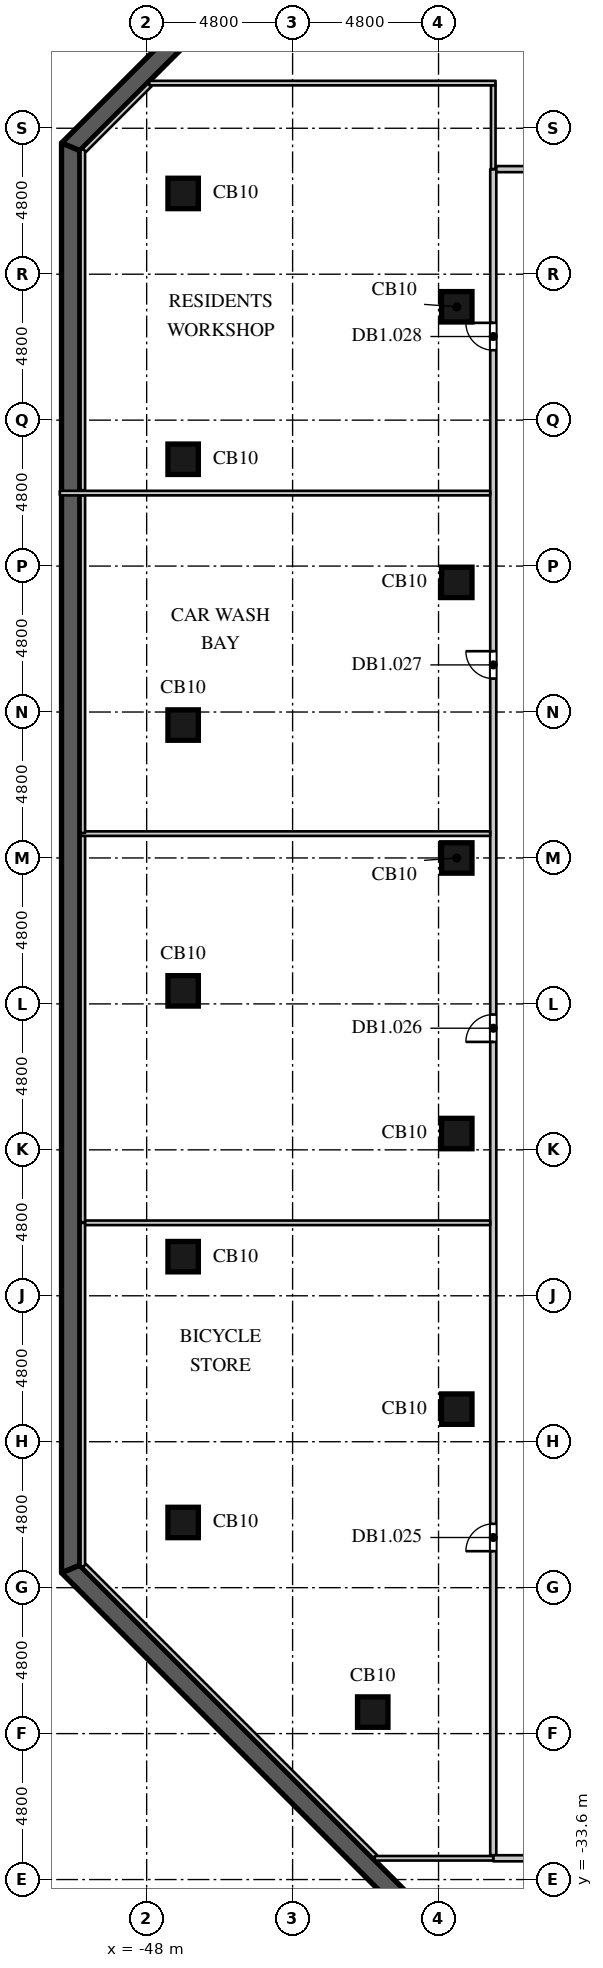
"""IFC4 building model, lengths in metres.
Left out: names, types, materials, properties, quantities, classifications, styles, units other than length and angle.
Written with IfcOpenShell. Run it as: python <this file> out.ifc"""

import sys

from ifc_helpers import new_model, si_unit, direction, frame, frame_2d, origin, origin_2d, place, context, subcontext, project, spatial, polyline, rectangle, outline, extrude, element, fill, save


model = new_model("IFC4")
c1 = context("Model", 3, precision=1e-05, world=origin(), true_north=direction((0.0, 1.0)))
c2 = subcontext(c1, "Body", "Model", "MODEL_VIEW")
j1 = project(units=[si_unit("LENGTHUNIT", "METRE"), si_unit("PLANEANGLEUNIT", "RADIAN")], contexts=[c1])
p1 = place(None, origin())
s1 = spatial("IfcSite", under=j1, at=p1, CompositionType="ELEMENT")
p2 = place(p1, origin())
s2 = spatial("IfcBuilding", under=s1, at=p2, CompositionType="ELEMENT")
p3 = place(p2, frame((0.0, 0.0, -4.5)))
s3 = spatial("IfcBuildingStorey", under=s2, at=p3, CompositionType="ELEMENT", Elevation=-4.5)
p4 = place(p3, origin())
e1 = element("IfcWall", 1, at=p4, inside=s3, PredefinedType="SOLIDWALL", context=c2, shape_type="SweptSolid", body=[
    extrude(outline(polyline([(-23.513, 50.8), (-50.8, 23.513), (-50.2, 23.264), (-23.264, 50.2), (-23.513, 50.8)])), origin(), (0.0, 0.0, 1.0), 4.5),
])
p5 = place(p3, origin())
e2 = element("IfcWall", 2, at=p5, inside=s3, PredefinedType="SOLIDWALL", context=c2, shape_type="SweptSolid", body=[
    extrude(outline(polyline([(-50.8, 23.513), (-50.8, -23.513), (-50.2, -23.264), (-50.2, 23.264), (-50.8, 23.513)])), origin(), (0.0, 0.0, 1.0), 4.5),
])
p6 = place(p3, origin())
e3 = element("IfcWall", 3, at=p6, inside=s3, PredefinedType="SOLIDWALL", context=c2, shape_type="SweptSolid", body=[
    extrude(outline(polyline([(-50.8, -23.513), (-23.513, -50.8), (-23.264, -50.2), (-50.2, -23.264), (-50.8, -23.513)])), origin(), (0.0, 0.0, 1.0), 4.5),
])
for number, where, z_axis, x_axis in (
    (4, (-40.564, -28.092, 0.0), (0.0, 0.0, 1.0), (1.0, 0.0, 0.0)),
    (5, (-46.8, -21.856, 0.0), (0.0, 0.0, 1.0), (1.0, 0.0, 0.0)),
    (6, (-37.8, -18.128, 0.0), (0.0, 0.0, 1.0), (1.0, 0.0, 0.0)),
    (7, (-46.8, -13.114, 0.0), (0.0, 0.0, 1.0), (1.0, 0.0, 0.0)),
    (8, (-37.8, -9.064, 0.0), (0.0, 0.0, 1.0), (1.0, 0.0, 0.0)),
    (9, (-46.8, -4.371, 0.0), (0.0, 0.0, 1.0), (1.0, 0.0, 0.0)),
    (10, (-37.8, 0.0, 0.0), (0.0, 0.0, 1.0), (1.0, 0.0, 0.0)),
    (11, (-46.8, 4.371, 0.0), (0.0, 0.0, 1.0), (1.0, 0.0, 0.0)),
    (12, (-37.8, 9.064, 0.0), (0.0, 0.0, 1.0), (1.0, 0.0, 0.0)),
    (13, (-46.8, 13.114, 0.0), (0.0, 0.0, 1.0), (1.0, 0.0, 0.0)),
    (14, (-37.8, 18.128, 0.0), (0.0, 0.0, 1.0), (1.0, 0.0, 0.0)),
    (15, (-46.8, 21.856, 0.0), (0.0, 0.0, 1.0), (1.0, 0.0, 0.0)),
):
    element("IfcColumn", number, at=place(p3, frame(where, z_axis=z_axis, x_axis=x_axis)), inside=s3, PredefinedType="COLUMN", context=c2, shape_type="SweptSolid", body=[
        extrude(rectangle(XDim=1.0, YDim=1.0, at=origin_2d()), origin(), (0.0, 0.0, 1.0), 4.5),
    ])
p7 = place(p3, frame((-36.6, -32.8, 0.0), z_axis=(0.0, 0.0, 1.0), x_axis=(0.0, 1.0, 0.0)))
e16 = element("IfcWall", 16, at=p7, inside=s3, PredefinedType="PARTITIONING", context=c2, shape_type="SweptSolid", body=[
    extrude(rectangle(XDim=55.456, YDim=0.2, at=frame_2d((27.728, 0.0))), origin(), (0.0, 0.0, 1.0), 4.048),
])
p8 = place(p7, frame((10.0, 0.0, 0.0)))
e17 = element("IfcOpeningElement", 17, at=p8, cuts=e16, PredefinedType="OPENING", context=c2, shape_type="SweptSolid", body=[
    extrude(rectangle(XDim=0.9, YDim=2.2, at=frame_2d((0.45, 1.1))), frame((0.0, 0.11, 0.0), z_axis=(0.0, -1.0, 0.0), x_axis=(1.0, 0.0, 0.0)), (0.0, 0.0, 1.0), 0.22),
])
p9 = place(p7, frame((26.75, 0.0, 0.0)))
e18 = element("IfcOpeningElement", 18, at=p9, cuts=e16, PredefinedType="OPENING", context=c2, shape_type="SweptSolid", body=[
    extrude(rectangle(XDim=0.9, YDim=2.2, at=frame_2d((0.45, 1.1))), frame((0.0, 0.11, 0.0), z_axis=(0.0, -1.0, 0.0), x_axis=(1.0, 0.0, 0.0)), (0.0, 0.0, 1.0), 0.22),
])
p10 = place(p7, frame((38.7, 0.0, 0.0)))
e19 = element("IfcOpeningElement", 19, at=p10, cuts=e16, PredefinedType="OPENING", context=c2, shape_type="SweptSolid", body=[
    extrude(rectangle(XDim=0.9, YDim=2.2, at=frame_2d((0.45, 1.1))), frame((0.0, 0.11, 0.0), z_axis=(0.0, -1.0, 0.0), x_axis=(1.0, 0.0, 0.0)), (0.0, 0.0, 1.0), 0.22),
])
p11 = place(p7, frame((49.5, 0.0, 0.0)))
e20 = element("IfcOpeningElement", 20, at=p11, cuts=e16, PredefinedType="OPENING", context=c2, shape_type="SweptSolid", body=[
    extrude(rectangle(XDim=0.9, YDim=2.2, at=frame_2d((0.45, 1.1))), frame((0.0, 0.11, 0.0), z_axis=(0.0, -1.0, 0.0), x_axis=(1.0, 0.0, 0.0)), (0.0, 0.0, 1.0), 0.22),
])
p12 = place(p3, frame((-36.6, -32.9, 0.0), z_axis=(0.0, 0.0, 1.0), x_axis=(1.0, 0.0, 0.0)))
e21 = element("IfcWall", 21, at=p12, inside=s3, PredefinedType="PARTITIONING", context=c2, shape_type="SweptSolid", body=[
    extrude(rectangle(XDim=3.8, YDim=0.2, at=frame_2d((1.9, 0.0))), origin(), (0.0, 0.0, 1.0), 4.048),
])
p13 = place(p3, frame((-36.5, 22.656, 0.0), z_axis=(0.0, 0.0, 1.0), x_axis=(1.0, 0.0, 0.0)))
e22 = element("IfcWall", 22, at=p13, inside=s3, PredefinedType="PARTITIONING", context=c2, shape_type="SweptSolid", body=[
    extrude(rectangle(XDim=3.6, YDim=0.2, at=frame_2d((1.8, 0.0))), origin(), (0.0, 0.0, 1.0), 4.048),
])
p14 = place(p3, frame((-50.1, -23.298, 0.0), z_axis=(0.0, 0.0, 1.0), x_axis=(0.0, 1.0, 0.0)))
e23 = element("IfcWall", 23, at=p14, inside=s3, PredefinedType="PARTITIONING", context=c2, shape_type="SweptSolid", body=[
    extrude(rectangle(XDim=11.298, YDim=0.15, at=frame_2d((5.649, 0.0))), origin(), (0.0, 0.0, 1.0), 4.048),
])
p15 = place(p3, frame((-50.047, -23.276, 0.0), z_axis=(0.0, 0.0, 1.0), x_axis=(0.707106781187, -0.707106781187, 0.0)))
e24 = element("IfcWall", 24, at=p15, inside=s3, PredefinedType="PARTITIONING", context=c2, shape_type="SweptSolid", body=[
    extrude(rectangle(XDim=13.535, YDim=0.15, at=frame_2d((6.768, 0.0))), origin(), (0.0, 0.0, 1.0), 4.048),
])
p16 = place(p3, frame((-50.025, -12.0, 0.0), z_axis=(0.0, 0.0, 1.0), x_axis=(1.0, 0.0, 0.0)))
e25 = element("IfcWall", 25, at=p16, inside=s3, PredefinedType="PARTITIONING", context=c2, shape_type="SweptSolid", body=[
    extrude(rectangle(XDim=13.325, YDim=0.15, at=frame_2d((6.663, 0.0))), origin(), (0.0, 0.0, 1.0), 4.048),
])
p17 = place(p3, frame((-50.1, -11.98, 0.0), z_axis=(0.0, 0.0, 1.0), x_axis=(0.0, 1.0, 0.0)))
e26 = element("IfcWall", 26, at=p17, inside=s3, PredefinedType="PARTITIONING", context=c2, shape_type="SweptSolid", body=[
    extrude(rectangle(XDim=12.78, YDim=0.15, at=frame_2d((6.39, 0.0))), origin(), (0.0, 0.0, 1.0), 4.048),
])
p18 = place(p3, frame((-50.175, 0.8, 0.0), z_axis=(0.0, 0.0, 1.0), x_axis=(1.0, 0.0, 0.0)))
e27 = element("IfcWall", 27, at=p18, inside=s3, PredefinedType="PARTITIONING", context=c2, shape_type="SweptSolid", body=[
    extrude(rectangle(XDim=13.475, YDim=0.15, at=frame_2d((6.738, 0.0))), origin(), (0.0, 0.0, 1.0), 4.048),
])
p19 = place(p3, frame((-50.1, 0.82, 0.0), z_axis=(0.0, 0.0, 1.0), x_axis=(0.0, 1.0, 0.0)))
e28 = element("IfcWall", 28, at=p19, inside=s3, PredefinedType="PARTITIONING", context=c2, shape_type="SweptSolid", body=[
    extrude(rectangle(XDim=11.105, YDim=0.15, at=frame_2d((5.552, 0.0))), origin(), (0.0, 0.0, 1.0), 4.048),
])
p20 = place(p3, frame((-50.855, 12.0, 0.0), z_axis=(0.0, 0.0, 1.0), x_axis=(1.0, 0.0, 0.0)))
e29 = element("IfcWall", 29, at=p20, inside=s3, PredefinedType="PARTITIONING", context=c2, shape_type="SweptSolid", body=[
    extrude(rectangle(XDim=14.155, YDim=0.15, at=frame_2d((7.078, 0.0))), origin(), (0.0, 0.0, 1.0), 4.048),
])
p21 = place(p3, frame((-50.1, 12.095, 0.0), z_axis=(0.0, 0.0, 1.0), x_axis=(0.0, 1.0, 0.0)))
e30 = element("IfcWall", 30, at=p21, inside=s3, PredefinedType="PARTITIONING", context=c2, shape_type="SweptSolid", body=[
    extrude(rectangle(XDim=11.203, YDim=0.15, at=frame_2d((5.602, 0.0))), origin(), (0.0, 0.0, 1.0), 4.048),
])
p22 = place(p3, frame((-50.047, 23.276, 0.0), z_axis=(0.0, 0.0, 1.0), x_axis=(0.707146808742, 0.707066751365, 0.0)))
e31 = element("IfcWall", 31, at=p22, inside=s3, PredefinedType="PARTITIONING", context=c2, shape_type="SweptSolid", body=[
    extrude(rectangle(XDim=3.05, YDim=0.15, at=frame_2d((1.525, 0.0))), origin(), (0.0, 0.0, 1.0), 4.048),
])
p23 = place(p3, frame((-47.912, 25.485, 0.0), z_axis=(0.0, 0.0, 1.0), x_axis=(1.0, 0.0, 0.0)))
e32 = element("IfcWall", 32, at=p23, inside=s3, PredefinedType="PARTITIONING", context=c2, shape_type="SweptSolid", body=[
    extrude(rectangle(XDim=11.387, YDim=0.15, at=frame_2d((5.694, 0.0))), origin(), (0.0, 0.0, 1.0), 4.048),
])
p24 = place(p3, frame((-40.498, -32.9, 0.0), z_axis=(0.0, 0.0, 1.0), x_axis=(1.0, 0.0, 0.0)))
e33 = element("IfcWall", 33, at=p24, inside=s3, PredefinedType="PARTITIONING", context=c2, shape_type="SweptSolid", body=[
    extrude(rectangle(XDim=3.898, YDim=0.15, at=frame_2d((1.949, 0.0))), origin(), (0.0, 0.0, 1.0), 4.048),
])
p25 = place(p3, frame((-36.6, 22.656, 0.0), z_axis=(0.0, 0.0, 1.0), x_axis=(0.0, 1.0, 0.0)))
e34 = element("IfcWall", 34, at=p25, inside=s3, PredefinedType="PARTITIONING", context=c2, shape_type="SweptSolid", body=[
    extrude(rectangle(XDim=2.755, YDim=0.15, at=frame_2d((1.377, 0.0))), origin(), (0.0, 0.0, 1.0), 4.048),
])
p26 = place(p8, origin())
e35 = element("IfcDoor", 35, at=p26, inside=s3, OperationType="SINGLE_SWING_LEFT", PredefinedType="DOOR", context=c2, shape_type="SweptSolid", body=[
    extrude(rectangle(XDim=0.9, YDim=2.2, at=frame_2d((0.45, 1.1))), frame((0.0, 0.025, 0.0), z_axis=(0.0, -1.0, 0.0), x_axis=(1.0, 0.0, 0.0)), (0.0, 0.0, 1.0), 0.05),
])
fill(e17, e35)
p27 = place(p9, origin())
e36 = element("IfcDoor", 36, at=p27, inside=s3, OperationType="SINGLE_SWING_LEFT", PredefinedType="DOOR", context=c2, shape_type="SweptSolid", body=[
    extrude(rectangle(XDim=0.9, YDim=2.2, at=frame_2d((0.45, 1.1))), frame((0.0, 0.025, 0.0), z_axis=(0.0, -1.0, 0.0), x_axis=(1.0, 0.0, 0.0)), (0.0, 0.0, 1.0), 0.05),
])
fill(e18, e36)
p28 = place(p10, origin())
e37 = element("IfcDoor", 37, at=p28, inside=s3, OperationType="SINGLE_SWING_RIGHT", PredefinedType="DOOR", context=c2, shape_type="SweptSolid", body=[
    extrude(rectangle(XDim=0.9, YDim=2.2, at=frame_2d((0.45, 1.1))), frame((0.0, 0.025, 0.0), z_axis=(0.0, -1.0, 0.0), x_axis=(1.0, 0.0, 0.0)), (0.0, 0.0, 1.0), 0.05),
])
fill(e19, e37)
p29 = place(p11, origin())
e38 = element("IfcDoor", 38, at=p29, inside=s3, OperationType="SINGLE_SWING_RIGHT", PredefinedType="DOOR", context=c2, shape_type="SweptSolid", body=[
    extrude(rectangle(XDim=0.9, YDim=2.2, at=frame_2d((0.45, 1.1))), frame((0.0, 0.025, 0.0), z_axis=(0.0, -1.0, 0.0), x_axis=(1.0, 0.0, 0.0)), (0.0, 0.0, 1.0), 0.05),
])
fill(e20, e38)
save(model, sys.argv[1])
